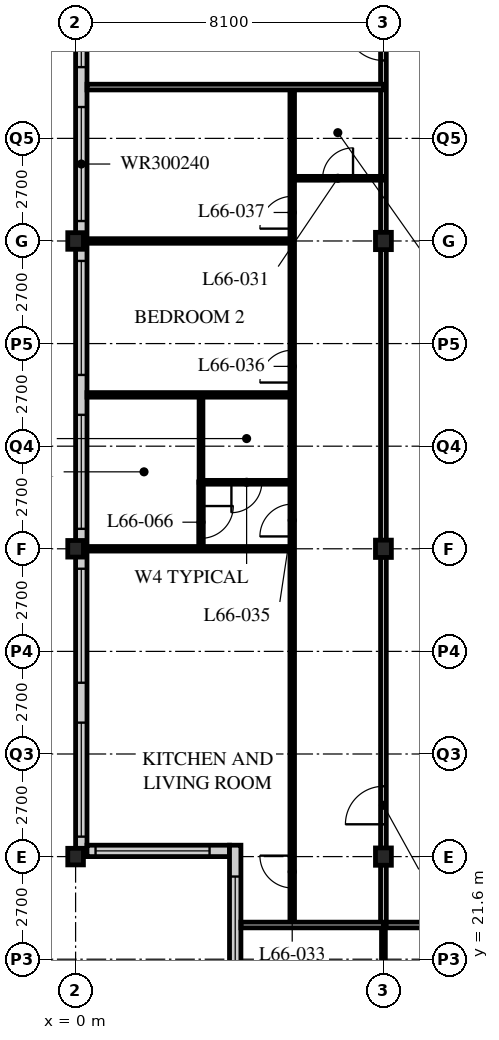
"""IFC4 building model, lengths in metres.
Left out: names, types, materials, properties, quantities, classifications, styles, units other than length and angle.
Written with IfcOpenShell. Run it as: python <this file> out.ifc"""

import sys

from ifc_helpers import new_model, si_unit, direction, frame, frame_2d, origin, origin_2d, place, context, subcontext, project, spatial, rectangle, i_section, extrude, element, fill, save


model = new_model("IFC4")
c1 = context("Model", 3, precision=1e-05, world=origin(), true_north=direction((0.0, 1.0)))
c2 = subcontext(c1, "Body", "Model", "MODEL_VIEW")
j1 = project(units=[si_unit("LENGTHUNIT", "METRE"), si_unit("PLANEANGLEUNIT", "RADIAN")], contexts=[c1])
p1 = place(None, origin())
s1 = spatial("IfcSite", under=j1, at=p1, CompositionType="ELEMENT")
p2 = place(p1, origin())
s2 = spatial("IfcBuilding", under=s1, at=p2, CompositionType="ELEMENT")
p3 = place(p2, frame((0.0, 0.0, 258.0)))
s3 = spatial("IfcBuildingStorey", under=s2, at=p3, CompositionType="ELEMENT", Elevation=258.0)
for number, where, z_axis, x_axis in (
    (1, (0.0, 24.3, 0.0), (0.0, 0.0, 1.0), (1.0, 0.0, 0.0)),
    (2, (0.0, 32.4, 0.0), (0.0, 0.0, 1.0), (1.0, 0.0, 0.0)),
    (3, (0.0, 40.5, 0.0), (0.0, 0.0, 1.0), (1.0, 0.0, 0.0)),
):
    element("IfcColumn", number, at=place(p3, frame(where, z_axis=z_axis, x_axis=x_axis)), inside=s3, PredefinedType="COLUMN", context=c2, shape_type="SweptSolid", body=[
        extrude(i_section(OverallWidth=0.412, OverallDepth=0.437, WebThickness=0.036, FlangeThickness=0.058, FilletRadius=0.015, at=origin_2d()), origin(), (0.0, 0.0, 1.0), 3.9),
    ])
for number, where, z_axis, x_axis in (
    (4, (8.1, 24.3, 0.0), (0.0, 0.0, 1.0), (1.0, 0.0, 0.0)),
    (5, (8.1, 32.4, 0.0), (0.0, 0.0, 1.0), (1.0, 0.0, 0.0)),
    (6, (8.1, 40.5, 0.0), (0.0, 0.0, 1.0), (1.0, 0.0, 0.0)),
):
    element("IfcColumn", number, at=place(p3, frame(where, z_axis=z_axis, x_axis=x_axis)), inside=s3, PredefinedType="COLUMN", context=c2, shape_type="SweptSolid", body=[
        extrude(i_section(OverallWidth=0.418, OverallDepth=0.456, WebThickness=0.042, FlangeThickness=0.067, FilletRadius=0.015, at=origin_2d()), origin(), (0.0, 0.0, 1.0), 3.9),
    ])
p4 = place(p3, frame((0.15, 56.4, 0.0), z_axis=(0.0, 0.0, 1.0), x_axis=(0.0, -1.0, 0.0)))
e7 = element("IfcWall", 7, at=p4, inside=s3, PredefinedType="SOLIDWALL", context=c2, shape_type="SweptSolid", body=[
    extrude(rectangle(XDim=32.1, YDim=0.3, at=frame_2d((16.05, 0.0))), origin(), (0.0, 0.0, 1.0), 3.69),
])
p5 = place(p4, frame((0.225, 0.0, 0.6)))
e8 = element("IfcOpeningElement", 8, at=p5, cuts=e7, PredefinedType="OPENING", context=c2, shape_type="SweptSolid", body=[
    extrude(rectangle(XDim=3.0, YDim=2.4, at=frame_2d((1.5, 1.2))), frame((0.0, 0.16, 0.0), z_axis=(0.0, -1.0, 0.0), x_axis=(1.0, 0.0, 0.0)), (0.0, 0.0, 1.0), 0.32),
])
p6 = place(p4, frame((4.275, 0.0, 0.6)))
e9 = element("IfcOpeningElement", 9, at=p6, cuts=e7, PredefinedType="OPENING", context=c2, shape_type="SweptSolid", body=[
    extrude(rectangle(XDim=3.0, YDim=2.4, at=frame_2d((1.5, 1.2))), frame((0.0, 0.16, 0.0), z_axis=(0.0, -1.0, 0.0), x_axis=(1.0, 0.0, 0.0)), (0.0, 0.0, 1.0), 0.32),
])
p7 = place(p4, frame((8.325, 0.0, 0.6)))
e10 = element("IfcOpeningElement", 10, at=p7, cuts=e7, PredefinedType="OPENING", context=c2, shape_type="SweptSolid", body=[
    extrude(rectangle(XDim=3.0, YDim=2.4, at=frame_2d((1.5, 1.2))), frame((0.0, 0.16, 0.0), z_axis=(0.0, -1.0, 0.0), x_axis=(1.0, 0.0, 0.0)), (0.0, 0.0, 1.0), 0.32),
])
p8 = place(p4, frame((12.375, 0.0, 0.6)))
e11 = element("IfcOpeningElement", 11, at=p8, cuts=e7, PredefinedType="OPENING", context=c2, shape_type="SweptSolid", body=[
    extrude(rectangle(XDim=3.0, YDim=2.4, at=frame_2d((1.5, 1.2))), frame((0.0, 0.16, 0.0), z_axis=(0.0, -1.0, 0.0), x_axis=(1.0, 0.0, 0.0)), (0.0, 0.0, 1.0), 0.32),
])
p9 = place(p4, frame((16.425, 0.0, 0.6)))
e12 = element("IfcOpeningElement", 12, at=p9, cuts=e7, PredefinedType="OPENING", context=c2, shape_type="SweptSolid", body=[
    extrude(rectangle(XDim=3.0, YDim=2.4, at=frame_2d((1.5, 1.2))), frame((0.0, 0.16, 0.0), z_axis=(0.0, -1.0, 0.0), x_axis=(1.0, 0.0, 0.0)), (0.0, 0.0, 1.0), 0.32),
])
p10 = place(p4, frame((20.475, 0.0, 0.6)))
e13 = element("IfcOpeningElement", 13, at=p10, cuts=e7, PredefinedType="OPENING", context=c2, shape_type="SweptSolid", body=[
    extrude(rectangle(XDim=3.0, YDim=2.4, at=frame_2d((1.5, 1.2))), frame((0.0, 0.16, 0.0), z_axis=(0.0, -1.0, 0.0), x_axis=(1.0, 0.0, 0.0)), (0.0, 0.0, 1.0), 0.32),
])
p11 = place(p4, frame((24.525, 0.0, 0.6)))
e14 = element("IfcOpeningElement", 14, at=p11, cuts=e7, PredefinedType="OPENING", context=c2, shape_type="SweptSolid", body=[
    extrude(rectangle(XDim=3.0, YDim=2.4, at=frame_2d((1.5, 1.2))), frame((0.0, 0.16, 0.0), z_axis=(0.0, -1.0, 0.0), x_axis=(1.0, 0.0, 0.0)), (0.0, 0.0, 1.0), 0.32),
])
p12 = place(p4, frame((28.575, 0.0, 0.6)))
e15 = element("IfcOpeningElement", 15, at=p12, cuts=e7, PredefinedType="OPENING", context=c2, shape_type="SweptSolid", body=[
    extrude(rectangle(XDim=3.0, YDim=2.4, at=frame_2d((1.5, 1.2))), frame((0.0, 0.16, 0.0), z_axis=(0.0, -1.0, 0.0), x_axis=(1.0, 0.0, 0.0)), (0.0, 0.0, 1.0), 0.32),
])
p13 = place(p3, frame((0.3, 24.45, 0.0), z_axis=(0.0, 0.0, 1.0), x_axis=(1.0, 0.0, 0.0)))
e16 = element("IfcWall", 16, at=p13, inside=s3, PredefinedType="SOLIDWALL", context=c2, shape_type="SweptSolid", body=[
    extrude(rectangle(XDim=3.75, YDim=0.3, at=frame_2d((1.875, 0.0))), origin(), (0.0, 0.0, 1.0), 3.69),
])
p14 = place(p13, frame((0.225, 0.0, 0.6)))
e17 = element("IfcOpeningElement", 17, at=p14, cuts=e16, PredefinedType="OPENING", context=c2, shape_type="SweptSolid", body=[
    extrude(rectangle(XDim=3.0, YDim=2.3, at=frame_2d((1.5, 1.15))), frame((0.0, 0.16, 0.0), z_axis=(0.0, -1.0, 0.0), x_axis=(1.0, 0.0, 0.0)), (0.0, 0.0, 1.0), 0.32),
])
p15 = place(p3, frame((4.2, 24.6, 0.0), z_axis=(0.0, 0.0, 1.0), x_axis=(0.0, -1.0, 0.0)))
e18 = element("IfcWall", 18, at=p15, inside=s3, PredefinedType="SOLIDWALL", context=c2, shape_type="SweptSolid", body=[
    extrude(rectangle(XDim=4.35, YDim=0.3, at=frame_2d((2.175, 0.0))), origin(), (0.0, 0.0, 1.0), 3.69),
])
p16 = place(p15, frame((0.825, 0.0, 0.6)))
e19 = element("IfcOpeningElement", 19, at=p16, cuts=e18, PredefinedType="OPENING", context=c2, shape_type="SweptSolid", body=[
    extrude(rectangle(XDim=3.0, YDim=2.3, at=frame_2d((1.5, 1.15))), frame((0.0, 0.16, 0.0), z_axis=(0.0, -1.0, 0.0), x_axis=(1.0, 0.0, 0.0)), (0.0, 0.0, 1.0), 0.32),
])
p17 = place(p3, frame((8.1, 22.5, 0.0), z_axis=(0.0, 0.0, 1.0), x_axis=(1.0, 0.0, 0.0)))
e20 = element("IfcWall", 20, at=p17, inside=s3, PredefinedType="PARTITIONING", context=c2, shape_type="SweptSolid", body=[
    extrude(rectangle(XDim=28.35, YDim=0.15, at=frame_2d((14.175, 0.0))), origin(), (0.0, 0.0, 1.0), 3.69),
])
p18 = place(p17, frame((4.45, 0.0, 0.0)))
e21 = element("IfcOpeningElement", 21, at=p18, cuts=e20, PredefinedType="OPENING", context=c2, shape_type="SweptSolid", body=[
    extrude(rectangle(XDim=1.0, YDim=2.1, at=frame_2d((0.5, 1.05))), frame((0.0, 0.085, 0.0), z_axis=(0.0, -1.0, 0.0), x_axis=(1.0, 0.0, 0.0)), (0.0, 0.0, 1.0), 0.17),
])
p19 = place(p17, frame((12.55, 0.0, 0.0)))
e22 = element("IfcOpeningElement", 22, at=p19, cuts=e20, PredefinedType="OPENING", context=c2, shape_type="SweptSolid", body=[
    extrude(rectangle(XDim=1.0, YDim=2.1, at=frame_2d((0.5, 1.05))), frame((0.0, 0.085, 0.0), z_axis=(0.0, -1.0, 0.0), x_axis=(1.0, 0.0, 0.0)), (0.0, 0.0, 1.0), 0.17),
])
p20 = place(p17, frame((20.65, 0.0, 0.0)))
e23 = element("IfcOpeningElement", 23, at=p20, cuts=e20, PredefinedType="OPENING", context=c2, shape_type="SweptSolid", body=[
    extrude(rectangle(XDim=1.0, YDim=2.1, at=frame_2d((0.5, 1.05))), frame((0.0, 0.085, 0.0), z_axis=(0.0, -1.0, 0.0), x_axis=(1.0, 0.0, 0.0)), (0.0, 0.0, 1.0), 0.17),
])
p21 = place(p17, frame((2.625, 0.0, 0.0)))
e24 = element("IfcOpeningElement", 24, at=p21, cuts=e20, PredefinedType="OPENING", context=c2, shape_type="SweptSolid", body=[
    extrude(rectangle(XDim=1.0, YDim=2.1, at=frame_2d((0.5, 1.05))), frame((0.0, 0.085, 0.0), z_axis=(0.0, -1.0, 0.0), x_axis=(1.0, 0.0, 0.0)), (0.0, 0.0, 1.0), 0.17),
])
p22 = place(p3, frame((8.1, 22.5, 0.0), z_axis=(0.0, 0.0, 1.0), x_axis=(0.0, 1.0, 0.0)))
e25 = element("IfcWall", 25, at=p22, inside=s3, PredefinedType="PARTITIONING", context=c2, shape_type="SweptSolid", body=[
    extrude(rectangle(XDim=26.1, YDim=0.15, at=frame_2d((13.05, 0.0))), origin(), (0.0, 0.0, 1.0), 3.078),
])
p23 = place(p22, frame((2.65, 0.0, 0.0)))
e26 = element("IfcOpeningElement", 26, at=p23, cuts=e25, PredefinedType="OPENING", context=c2, shape_type="SweptSolid", body=[
    extrude(rectangle(XDim=1.0, YDim=2.1, at=frame_2d((0.5, 1.05))), frame((0.0, 0.085, 0.0), z_axis=(0.0, -1.0, 0.0), x_axis=(1.0, 0.0, 0.0)), (0.0, 0.0, 1.0), 0.17),
])
p24 = place(p22, frame((22.75, 0.0, 0.0)))
e27 = element("IfcOpeningElement", 27, at=p24, cuts=e25, PredefinedType="OPENING", context=c2, shape_type="SweptSolid", body=[
    extrude(rectangle(XDim=1.0, YDim=2.1, at=frame_2d((0.5, 1.05))), frame((0.0, 0.085, 0.0), z_axis=(0.0, -1.0, 0.0), x_axis=(1.0, 0.0, 0.0)), (0.0, 0.0, 1.0), 0.17),
])
p25 = place(p3, frame((5.7, 22.5, 0.0), z_axis=(0.0, 0.0, 1.0), x_axis=(0.0, 1.0, 0.0)))
e28 = element("IfcWall", 28, at=p25, inside=s3, PredefinedType="PARTITIONING", context=c2, shape_type="SweptSolid", body=[
    extrude(rectangle(XDim=22.05, YDim=0.12, at=frame_2d((11.025, 0.0))), origin(), (0.0, 0.0, 1.0), 3.69),
])
p26 = place(p25, frame((0.975, 0.0, 0.0)))
e29 = element("IfcOpeningElement", 29, at=p26, cuts=e28, PredefinedType="OPENING", context=c2, shape_type="SweptSolid", body=[
    extrude(rectangle(XDim=0.85, YDim=2.1, at=frame_2d((0.425, 1.05))), frame((0.0, 0.07, 0.0), z_axis=(0.0, -1.0, 0.0), x_axis=(1.0, 0.0, 0.0)), (0.0, 0.0, 1.0), 0.14),
])
p27 = place(p25, frame((10.225, 0.0, 0.0)))
e30 = element("IfcOpeningElement", 30, at=p27, cuts=e28, PredefinedType="OPENING", context=c2, shape_type="SweptSolid", body=[
    extrude(rectangle(XDim=0.85, YDim=2.1, at=frame_2d((0.425, 1.05))), frame((0.0, 0.07, 0.0), z_axis=(0.0, -1.0, 0.0), x_axis=(1.0, 0.0, 0.0)), (0.0, 0.0, 1.0), 0.14),
])
p28 = place(p25, frame((14.275, 0.0, 0.0)))
e31 = element("IfcOpeningElement", 31, at=p28, cuts=e28, PredefinedType="OPENING", context=c2, shape_type="SweptSolid", body=[
    extrude(rectangle(XDim=0.85, YDim=2.1, at=frame_2d((0.425, 1.05))), frame((0.0, 0.07, 0.0), z_axis=(0.0, -1.0, 0.0), x_axis=(1.0, 0.0, 0.0)), (0.0, 0.0, 1.0), 0.14),
])
p29 = place(p25, frame((18.325, 0.0, 0.0)))
e32 = element("IfcOpeningElement", 32, at=p29, cuts=e28, PredefinedType="OPENING", context=c2, shape_type="SweptSolid", body=[
    extrude(rectangle(XDim=0.85, YDim=2.1, at=frame_2d((0.425, 1.05))), frame((0.0, 0.07, 0.0), z_axis=(0.0, -1.0, 0.0), x_axis=(1.0, 0.0, 0.0)), (0.0, 0.0, 1.0), 0.14),
])
p30 = place(p3, frame((8.1, 42.15, 0.0), z_axis=(0.0, 0.0, 1.0), x_axis=(-1.0, 0.0, 0.0)))
e33 = element("IfcWall", 33, at=p30, inside=s3, PredefinedType="PARTITIONING", context=c2, shape_type="SweptSolid", body=[
    extrude(rectangle(XDim=2.4, YDim=0.1, at=frame_2d((1.2, 0.0))), origin(), (0.0, 0.0, 1.0), 3.69),
])
p31 = place(p30, frame((0.8, 0.0, 0.0)))
e34 = element("IfcOpeningElement", 34, at=p31, cuts=e33, PredefinedType="OPENING", context=c2, shape_type="SweptSolid", body=[
    extrude(rectangle(XDim=0.8, YDim=2.1, at=frame_2d((0.4, 1.05))), frame((0.0, 0.06, 0.0), z_axis=(0.0, -1.0, 0.0), x_axis=(1.0, 0.0, 0.0)), (0.0, 0.0, 1.0), 0.12),
])
p32 = place(p3, frame((5.7, 34.15, 0.0), z_axis=(0.0, 0.0, 1.0), x_axis=(-1.0, 0.0, 0.0)))
e35 = element("IfcWall", 35, at=p32, inside=s3, PredefinedType="PARTITIONING", context=c2, shape_type="SweptSolid", body=[
    extrude(rectangle(XDim=2.4, YDim=0.1, at=frame_2d((1.2, 0.0))), origin(), (0.0, 0.0, 1.0), 3.69),
])
p33 = place(p32, frame((0.8, 0.0, 0.0)))
e36 = element("IfcOpeningElement", 36, at=p33, cuts=e35, PredefinedType="OPENING", context=c2, shape_type="SweptSolid", body=[
    extrude(rectangle(XDim=0.8, YDim=2.1, at=frame_2d((0.4, 1.05))), frame((0.0, 0.06, 0.0), z_axis=(0.0, -1.0, 0.0), x_axis=(1.0, 0.0, 0.0)), (0.0, 0.0, 1.0), 0.12),
])
p34 = place(p3, frame((3.3, 34.15, 0.0), z_axis=(0.0, 0.0, 1.0), x_axis=(0.0, 1.0, 0.0)))
e37 = element("IfcWall", 37, at=p34, inside=s3, PredefinedType="PARTITIONING", context=c2, shape_type="SweptSolid", body=[
    extrude(rectangle(XDim=2.3, YDim=0.1, at=frame_2d((1.15, 0.0))), origin(), (0.0, 0.0, 1.0), 3.69),
])
p35 = place(p3, frame((5.7, 32.4, 0.0), z_axis=(0.0, 0.0, 1.0), x_axis=(-1.0, 0.0, 0.0)))
e38 = element("IfcWall", 38, at=p35, inside=s3, PredefinedType="PARTITIONING", context=c2, shape_type="SweptSolid", body=[
    extrude(rectangle(XDim=5.4, YDim=0.12, at=frame_2d((2.7, 0.0))), origin(), (0.0, 0.0, 1.0), 3.078),
])
p36 = place(p3, frame((5.7, 36.45, 0.0), z_axis=(0.0, 0.0, 1.0), x_axis=(-1.0, 0.0, 0.0)))
e39 = element("IfcWall", 39, at=p36, inside=s3, PredefinedType="PARTITIONING", context=c2, shape_type="SweptSolid", body=[
    extrude(rectangle(XDim=5.4, YDim=0.12, at=frame_2d((2.7, 0.0))), origin(), (0.0, 0.0, 1.0), 3.69),
])
p37 = place(p3, frame((5.7, 40.5, 0.0), z_axis=(0.0, 0.0, 1.0), x_axis=(-1.0, 0.0, 0.0)))
e40 = element("IfcWall", 40, at=p37, inside=s3, PredefinedType="PARTITIONING", context=c2, shape_type="SweptSolid", body=[
    extrude(rectangle(XDim=5.4, YDim=0.12, at=frame_2d((2.7, 0.0))), origin(), (0.0, 0.0, 1.0), 3.078),
])
p38 = place(p3, frame((8.1, 44.55, 0.0), z_axis=(0.0, 0.0, 1.0), x_axis=(-1.0, 0.0, 0.0)))
e41 = element("IfcWall", 41, at=p38, inside=s3, PredefinedType="PARTITIONING", context=c2, shape_type="SweptSolid", body=[
    extrude(rectangle(XDim=7.8, YDim=0.15, at=frame_2d((3.9, 0.0))), origin(), (0.0, 0.0, 1.0), 3.69),
])
p39 = place(p3, frame((8.1, 22.5, 0.0), z_axis=(0.0, 0.0, 1.0), x_axis=(0.0, -1.0, 0.0)))
e42 = element("IfcWall", 42, at=p39, inside=s3, PredefinedType="PARTITIONING", context=c2, shape_type="SweptSolid", body=[
    extrude(rectangle(XDim=1.95, YDim=0.1, at=frame_2d((0.975, 0.0))), origin(), (0.0, 0.0, 1.0), 3.078),
])
p40 = place(p3, frame((4.35, 22.5, 0.0), z_axis=(0.0, 0.0, 1.0), x_axis=(1.0, 0.0, 0.0)))
e43 = element("IfcWall", 43, at=p40, inside=s3, PredefinedType="PARTITIONING", context=c2, shape_type="SweptSolid", body=[
    extrude(rectangle(XDim=3.75, YDim=0.15, at=frame_2d((1.875, 0.0))), origin(), (0.0, 0.0, 1.0), 3.69),
])
p41 = place(p3, frame((3.3, 32.4, 0.0), z_axis=(0.0, 0.0, 1.0), x_axis=(0.0, 1.0, 0.0)))
e44 = element("IfcWall", 44, at=p41, inside=s3, PredefinedType="PARTITIONING", context=c2, shape_type="SweptSolid", body=[
    extrude(rectangle(XDim=1.76, YDim=0.12, at=frame_2d((0.88, 0.0))), origin(), (0.0, 0.0, 1.0), 3.69),
])
p42 = place(p41, frame((0.275, 0.0, 0.0)))
e45 = element("IfcOpeningElement", 45, at=p42, cuts=e44, PredefinedType="OPENING", context=c2, shape_type="SweptSolid", body=[
    extrude(rectangle(XDim=0.85, YDim=2.1, at=frame_2d((0.425, 1.05))), frame((0.0, 0.07, 0.0), z_axis=(0.0, -1.0, 0.0), x_axis=(1.0, 0.0, 0.0)), (0.0, 0.0, 1.0), 0.14),
])
p43 = place(p7, origin())
e46 = element("IfcWindow", 46, at=p43, inside=s3, PartitioningType="SINGLE_PANEL", PredefinedType="WINDOW", context=c2, shape_type="SweptSolid", body=[
    extrude(rectangle(XDim=3.0, YDim=2.4, at=frame_2d((1.5, 1.2))), frame((0.0, 0.03, 0.0), z_axis=(0.0, -1.0, 0.0), x_axis=(1.0, 0.0, 0.0)), (0.0, 0.0, 1.0), 0.06),
])
fill(e10, e46)
p44 = place(p8, origin())
e47 = element("IfcWindow", 47, at=p44, inside=s3, PartitioningType="SINGLE_PANEL", PredefinedType="WINDOW", context=c2, shape_type="SweptSolid", body=[
    extrude(rectangle(XDim=3.0, YDim=2.4, at=frame_2d((1.5, 1.2))), frame((0.0, 0.03, 0.0), z_axis=(0.0, -1.0, 0.0), x_axis=(1.0, 0.0, 0.0)), (0.0, 0.0, 1.0), 0.06),
])
fill(e11, e47)
p45 = place(p9, origin())
e48 = element("IfcWindow", 48, at=p45, inside=s3, PartitioningType="SINGLE_PANEL", PredefinedType="WINDOW", context=c2, shape_type="SweptSolid", body=[
    extrude(rectangle(XDim=3.0, YDim=2.4, at=frame_2d((1.5, 1.2))), frame((0.0, 0.03, 0.0), z_axis=(0.0, -1.0, 0.0), x_axis=(1.0, 0.0, 0.0)), (0.0, 0.0, 1.0), 0.06),
])
fill(e12, e48)
p46 = place(p10, origin())
e49 = element("IfcWindow", 49, at=p46, inside=s3, PartitioningType="SINGLE_PANEL", PredefinedType="WINDOW", context=c2, shape_type="SweptSolid", body=[
    extrude(rectangle(XDim=3.0, YDim=2.4, at=frame_2d((1.5, 1.2))), frame((0.0, 0.03, 0.0), z_axis=(0.0, -1.0, 0.0), x_axis=(1.0, 0.0, 0.0)), (0.0, 0.0, 1.0), 0.06),
])
fill(e13, e49)
p47 = place(p11, origin())
e50 = element("IfcWindow", 50, at=p47, inside=s3, PartitioningType="SINGLE_PANEL", PredefinedType="WINDOW", context=c2, shape_type="SweptSolid", body=[
    extrude(rectangle(XDim=3.0, YDim=2.4, at=frame_2d((1.5, 1.2))), frame((0.0, 0.03, 0.0), z_axis=(0.0, -1.0, 0.0), x_axis=(1.0, 0.0, 0.0)), (0.0, 0.0, 1.0), 0.06),
])
fill(e14, e50)
p48 = place(p12, origin())
e51 = element("IfcWindow", 51, at=p48, inside=s3, PartitioningType="SINGLE_PANEL", PredefinedType="WINDOW", context=c2, shape_type="SweptSolid", body=[
    extrude(rectangle(XDim=3.0, YDim=2.4, at=frame_2d((1.5, 1.2))), frame((0.0, 0.03, 0.0), z_axis=(0.0, -1.0, 0.0), x_axis=(1.0, 0.0, 0.0)), (0.0, 0.0, 1.0), 0.06),
])
fill(e15, e51)
p49 = place(p14, origin())
e52 = element("IfcWindow", 52, at=p49, inside=s3, PartitioningType="SINGLE_PANEL", PredefinedType="WINDOW", context=c2, shape_type="SweptSolid", body=[
    extrude(rectangle(XDim=3.0, YDim=2.3, at=frame_2d((1.5, 1.15))), frame((0.0, 0.03, 0.0), z_axis=(0.0, -1.0, 0.0), x_axis=(1.0, 0.0, 0.0)), (0.0, 0.0, 1.0), 0.06),
])
fill(e17, e52)
p50 = place(p16, origin())
e53 = element("IfcWindow", 53, at=p50, inside=s3, PartitioningType="SINGLE_PANEL", PredefinedType="WINDOW", context=c2, shape_type="SweptSolid", body=[
    extrude(rectangle(XDim=3.0, YDim=2.3, at=frame_2d((1.5, 1.15))), frame((0.0, 0.03, 0.0), z_axis=(0.0, -1.0, 0.0), x_axis=(1.0, 0.0, 0.0)), (0.0, 0.0, 1.0), 0.06),
])
fill(e19, e53)
p51 = place(p31, origin())
e54 = element("IfcDoor", 54, at=p51, inside=s3, OperationType="SINGLE_SWING_RIGHT", PredefinedType="DOOR", context=c2, shape_type="SweptSolid", body=[
    extrude(rectangle(XDim=0.8, YDim=2.1, at=frame_2d((0.4, 1.05))), frame((0.0, 0.025, 0.0), z_axis=(0.0, -1.0, 0.0), x_axis=(1.0, 0.0, 0.0)), (0.0, 0.0, 1.0), 0.05),
])
fill(e34, e54)
p52 = place(p23, origin())
e55 = element("IfcDoor", 55, at=p52, inside=s3, OperationType="SINGLE_SWING_LEFT", PredefinedType="DOOR", context=c2, shape_type="SweptSolid", body=[
    extrude(rectangle(XDim=1.0, YDim=2.1, at=frame_2d((0.5, 1.05))), frame((0.0, 0.025, 0.0), z_axis=(0.0, -1.0, 0.0), x_axis=(1.0, 0.0, 0.0)), (0.0, 0.0, 1.0), 0.05),
])
fill(e26, e55)
p53 = place(p26, origin())
e56 = element("IfcDoor", 56, at=p53, inside=s3, OperationType="SINGLE_SWING_RIGHT", PredefinedType="DOOR", context=c2, shape_type="SweptSolid", body=[
    extrude(rectangle(XDim=0.85, YDim=2.1, at=frame_2d((0.425, 1.05))), frame((0.0, 0.025, 0.0), z_axis=(0.0, -1.0, 0.0), x_axis=(1.0, 0.0, 0.0)), (0.0, 0.0, 1.0), 0.05),
])
fill(e29, e56)
p54 = place(p33, origin())
e57 = element("IfcDoor", 57, at=p54, inside=s3, OperationType="SINGLE_SWING_RIGHT", PredefinedType="DOOR", context=c2, shape_type="SweptSolid", body=[
    extrude(rectangle(XDim=0.8, YDim=2.1, at=frame_2d((0.4, 1.05))), frame((0.0, 0.025, 0.0), z_axis=(0.0, -1.0, 0.0), x_axis=(1.0, 0.0, 0.0)), (0.0, 0.0, 1.0), 0.05),
])
fill(e36, e57)
p55 = place(p27, origin())
e58 = element("IfcDoor", 58, at=p55, inside=s3, OperationType="SINGLE_SWING_LEFT", PredefinedType="DOOR", context=c2, shape_type="SweptSolid", body=[
    extrude(rectangle(XDim=0.85, YDim=2.1, at=frame_2d((0.425, 1.05))), frame((0.0, 0.025, 0.0), z_axis=(0.0, -1.0, 0.0), x_axis=(1.0, 0.0, 0.0)), (0.0, 0.0, 1.0), 0.05),
])
fill(e30, e58)
p56 = place(p28, origin())
e59 = element("IfcDoor", 59, at=p56, inside=s3, OperationType="SINGLE_SWING_LEFT", PredefinedType="DOOR", context=c2, shape_type="SweptSolid", body=[
    extrude(rectangle(XDim=0.85, YDim=2.1, at=frame_2d((0.425, 1.05))), frame((0.0, 0.025, 0.0), z_axis=(0.0, -1.0, 0.0), x_axis=(1.0, 0.0, 0.0)), (0.0, 0.0, 1.0), 0.05),
])
fill(e31, e59)
p57 = place(p29, origin())
e60 = element("IfcDoor", 60, at=p57, inside=s3, OperationType="SINGLE_SWING_LEFT", PredefinedType="DOOR", context=c2, shape_type="SweptSolid", body=[
    extrude(rectangle(XDim=0.85, YDim=2.1, at=frame_2d((0.425, 1.05))), frame((0.0, 0.025, 0.0), z_axis=(0.0, -1.0, 0.0), x_axis=(1.0, 0.0, 0.0)), (0.0, 0.0, 1.0), 0.05),
])
fill(e32, e60)
p58 = place(p24, origin())
e61 = element("IfcDoor", 61, at=p58, inside=s3, OperationType="SINGLE_SWING_RIGHT", PredefinedType="DOOR", context=c2, shape_type="SweptSolid", body=[
    extrude(rectangle(XDim=1.0, YDim=2.1, at=frame_2d((0.5, 1.05))), frame((0.0, 0.025, 0.0), z_axis=(0.0, -1.0, 0.0), x_axis=(1.0, 0.0, 0.0)), (0.0, 0.0, 1.0), 0.05),
])
fill(e27, e61)
p59 = place(p42, origin())
e62 = element("IfcDoor", 62, at=p59, inside=s3, OperationType="SINGLE_SWING_LEFT", PredefinedType="DOOR", context=c2, shape_type="SweptSolid", body=[
    extrude(rectangle(XDim=0.85, YDim=2.1, at=frame_2d((0.425, 1.05))), frame((0.0, 0.025, 0.0), z_axis=(0.0, -1.0, 0.0), x_axis=(1.0, 0.0, 0.0)), (0.0, 0.0, 1.0), 0.05),
])
fill(e45, e62)
save(model, sys.argv[1])
